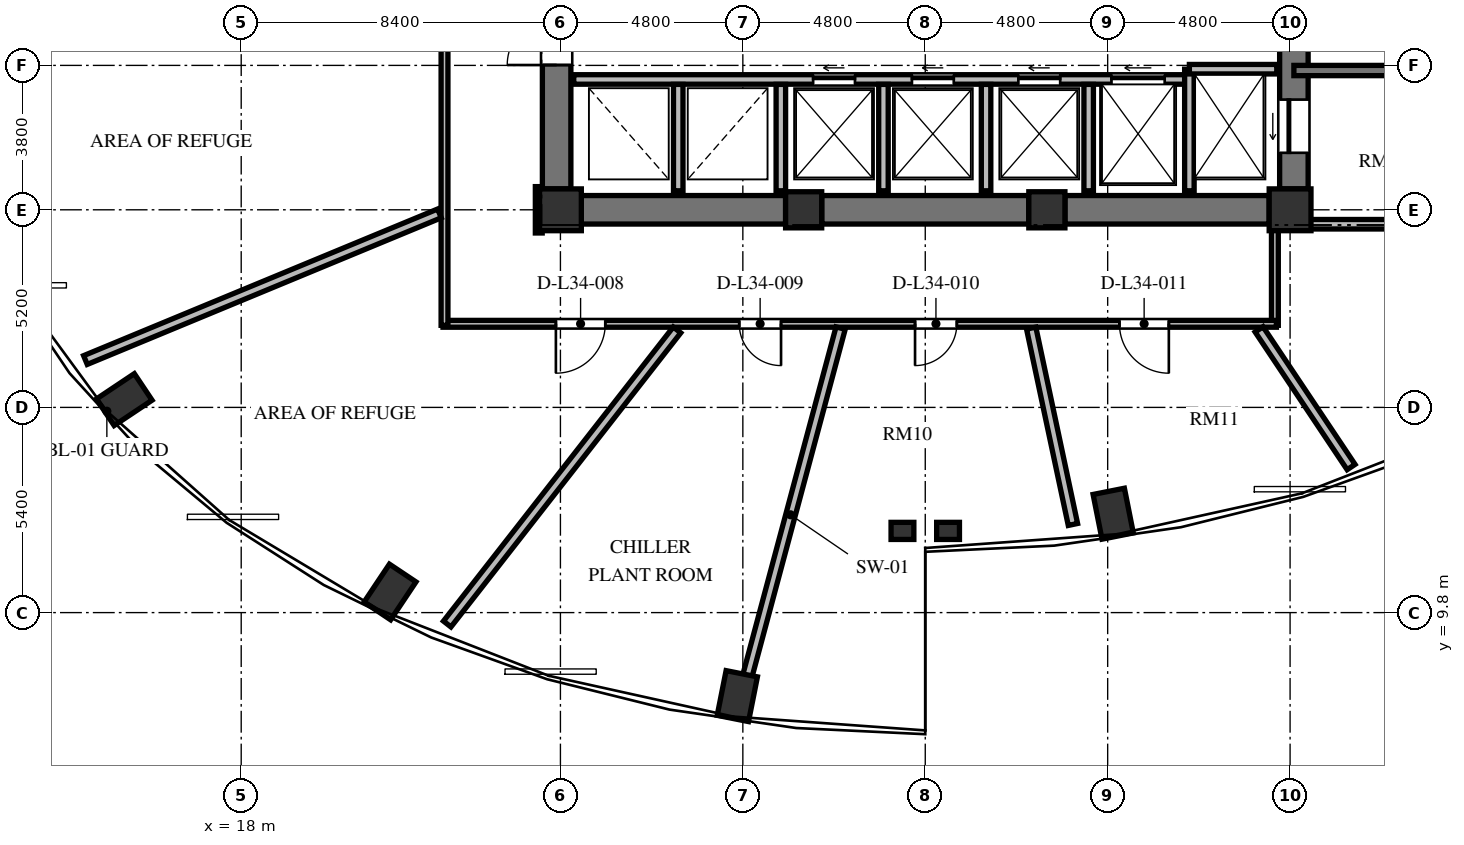
"""IFC4 building model, lengths in metres.
Left out: names, types, materials, properties, quantities, classifications, styles, units other than length and angle.
Written with IfcOpenShell. Run it as: python <this file> out.ifc"""

import sys

from ifc_helpers import new_model, si_unit, direction, frame, frame_2d, origin, origin_2d, place, context, subcontext, project, spatial, rectangle, extrude, element, fill, save


model = new_model("IFC4")
c1 = context("Model", 3, precision=1e-05, world=origin(), true_north=direction((0.0, 1.0)))
c2 = subcontext(c1, "Body", "Model", "MODEL_VIEW")
j1 = project(units=[si_unit("LENGTHUNIT", "METRE"), si_unit("PLANEANGLEUNIT", "RADIAN")], contexts=[c1])
p1 = place(None, origin())
s1 = spatial("IfcSite", under=j1, at=p1, CompositionType="ELEMENT")
p2 = place(p1, origin())
s2 = spatial("IfcBuilding", under=s1, at=p2, CompositionType="ELEMENT")
p3 = place(p2, frame((0.0, 0.0, 132.816)))
s3 = spatial("IfcBuildingStorey", under=s2, at=p3, CompositionType="ELEMENT", Elevation=132.816)
for number, where, z_axis, x_axis in (
    (1, (40.946, 12.403, 0.0), (0.0, 0.0, 1.0), (0.195, -0.981, 0.0)),
    (2, (14.922, 15.405, 0.0), (0.0, 0.0, 1.0), (-0.831, -0.556, 0.0)),
    (3, (21.916, 10.343, 0.0), (0.0, 0.0, 1.0), (-0.556, -0.831, 0.0)),
    (4, (31.054, 7.603, 0.0), (0.0, 0.0, 1.0), (-0.195, -0.981, 0.0)),
):
    element("IfcColumn", number, at=place(p3, frame(where, z_axis=z_axis, x_axis=x_axis)), inside=s3, PredefinedType="COLUMN", context=c2, shape_type="SweptSolid", body=[
        extrude(rectangle(XDim=1.2, YDim=0.84, at=origin_2d()), origin(), (0.0, 0.0, 1.0), 5.472),
    ])
p4 = place(p3, frame((26.4, 20.4, 0.0), z_axis=(0.0, 0.0, 1.0), x_axis=(1.0, 0.0, 0.0)))
e5 = element("IfcColumn", 5, at=p4, inside=s3, PredefinedType="COLUMN", context=c2, shape_type="SweptSolid", body=[
    extrude(rectangle(XDim=1.1, YDim=1.1, at=origin_2d()), origin(), (0.0, 0.0, 1.0), 5.472),
])
for number, where, z_axis, x_axis in (
    (6, (32.8, 20.4, 0.0), (0.0, 0.0, 1.0), (1.0, 0.0, 0.0)),
    (7, (39.2, 20.4, 0.0), (0.0, 0.0, 1.0), (1.0, 0.0, 0.0)),
):
    element("IfcColumn", number, at=place(p3, frame(where, z_axis=z_axis, x_axis=x_axis)), inside=s3, PredefinedType="COLUMN", context=c2, shape_type="SweptSolid", body=[
        extrude(rectangle(XDim=0.95, YDim=0.95, at=origin_2d()), origin(), (0.0, 0.0, 1.0), 5.472),
    ])
p5 = place(p3, frame((45.6, 20.4, 0.0), z_axis=(0.0, 0.0, 1.0), x_axis=(1.0, 0.0, 0.0)))
e8 = element("IfcColumn", 8, at=p5, inside=s3, PredefinedType="COLUMN", context=c2, shape_type="SweptSolid", body=[
    extrude(rectangle(XDim=1.1, YDim=1.1, at=origin_2d()), origin(), (0.0, 0.0, 1.0), 5.472),
])
for number, where, z_axis, x_axis in (
    (9, (35.4, 11.95, 0.0), (0.0, 0.0, 1.0), (1.0, 0.0, 0.0)),
    (10, (36.6, 11.95, 0.0), (0.0, 0.0, 1.0), (1.0, 0.0, 0.0)),
):
    element("IfcColumn", number, at=place(p3, frame(where, z_axis=z_axis, x_axis=x_axis)), inside=s3, PredefinedType="PILASTER", context=c2, shape_type="SweptSolid", body=[
        extrude(rectangle(XDim=0.6, YDim=0.45, at=origin_2d()), origin(), (0.0, 0.0, 1.0), 5.472),
    ])
p6 = place(p3, frame((26.3, 20.95, 0.0), z_axis=(0.0, 0.0, 1.0), x_axis=(0.0, 1.0, 0.0)))
e11 = element("IfcWall", 11, at=p6, inside=s3, PredefinedType="SHEAR", context=c2, shape_type="SweptSolid", body=[
    extrude(rectangle(XDim=14.1, YDim=0.75, at=frame_2d((7.05, 0.0))), origin(), (0.0, 0.0, 1.0), 5.472),
])
p7 = place(p6, frame((6.5, 0.0, 0.0)))
e12 = element("IfcOpeningElement", 12, at=p7, cuts=e11, PredefinedType="OPENING", context=c2, shape_type="SweptSolid", body=[
    extrude(rectangle(XDim=1.2, YDim=2.15, at=frame_2d((0.6, 1.075))), frame((0.0, 0.385, 0.0), z_axis=(0.0, -1.0, 0.0), x_axis=(1.0, 0.0, 0.0)), (0.0, 0.0, 1.0), 0.77),
])
p8 = place(p6, frame((9.6, 0.0, 0.0)))
e13 = element("IfcOpeningElement", 13, at=p8, cuts=e11, PredefinedType="OPENING", context=c2, shape_type="SweptSolid", body=[
    extrude(rectangle(XDim=1.3, YDim=2.2, at=frame_2d((0.65, 1.1))), frame((0.0, 0.385, 0.0), z_axis=(0.0, -1.0, 0.0), x_axis=(1.0, 0.0, 0.0)), (0.0, 0.0, 1.0), 0.77),
])
p9 = place(p6, frame((3.26, 0.0, 0.0)))
e14 = element("IfcOpeningElement", 14, at=p9, cuts=e11, PredefinedType="OPENING", context=c2, shape_type="SweptSolid", body=[
    extrude(rectangle(XDim=1.3, YDim=2.2, at=frame_2d((0.65, 1.1))), frame((0.0, 0.385, 0.0), z_axis=(0.0, -1.0, 0.0), x_axis=(1.0, 0.0, 0.0)), (0.0, 0.0, 1.0), 0.77),
])
p10 = place(p3, frame((45.7, 20.95, 0.0), z_axis=(0.0, 0.0, 1.0), x_axis=(0.0, 1.0, 0.0)))
e15 = element("IfcWall", 15, at=p10, inside=s3, PredefinedType="SHEAR", context=c2, shape_type="SweptSolid", body=[
    extrude(rectangle(XDim=14.1, YDim=0.75, at=frame_2d((7.05, 0.0))), origin(), (0.0, 0.0, 1.0), 5.472),
])
p11 = place(p10, frame((11.75, 0.0, 0.0)))
e16 = element("IfcOpeningElement", 16, at=p11, cuts=e15, PredefinedType="OPENING", context=c2, shape_type="SweptSolid", body=[
    extrude(rectangle(XDim=1.4, YDim=2.3, at=frame_2d((0.7, 1.15))), frame((0.0, 0.385, 0.0), z_axis=(0.0, -1.0, 0.0), x_axis=(1.0, 0.0, 0.0)), (0.0, 0.0, 1.0), 0.77),
])
p12 = place(p10, frame((0.95, 0.0, 0.0)))
e17 = element("IfcOpeningElement", 17, at=p12, cuts=e15, PredefinedType="OPENING", context=c2, shape_type="SweptSolid", body=[
    extrude(rectangle(XDim=1.4, YDim=2.3, at=frame_2d((0.7, 1.15))), frame((0.0, 0.385, 0.0), z_axis=(0.0, -1.0, 0.0), x_axis=(1.0, 0.0, 0.0)), (0.0, 0.0, 1.0), 0.77),
])
p13 = place(p3, frame((26.95, 20.4, 0.0), z_axis=(0.0, 0.0, 1.0), x_axis=(1.0, 0.0, 0.0)))
e18 = element("IfcWall", 18, at=p13, inside=s3, PredefinedType="SHEAR", context=c2, shape_type="SweptSolid", body=[
    extrude(rectangle(XDim=5.375, YDim=0.75, at=frame_2d((2.688, 0.0))), origin(), (0.0, 0.0, 1.0), 5.472),
])
p14 = place(p3, frame((33.275, 20.4, 0.0), z_axis=(0.0, 0.0, 1.0), x_axis=(1.0, 0.0, 0.0)))
e19 = element("IfcWall", 19, at=p14, inside=s3, PredefinedType="SHEAR", context=c2, shape_type="SweptSolid", body=[
    extrude(rectangle(XDim=5.45, YDim=0.75, at=frame_2d((2.725, 0.0))), origin(), (0.0, 0.0, 1.0), 5.472),
])
p15 = place(p3, frame((39.675, 20.4, 0.0), z_axis=(0.0, 0.0, 1.0), x_axis=(1.0, 0.0, 0.0)))
e20 = element("IfcWall", 20, at=p15, inside=s3, PredefinedType="SHEAR", context=c2, shape_type="SweptSolid", body=[
    extrude(rectangle(XDim=5.375, YDim=0.75, at=frame_2d((2.688, 0.0))), origin(), (0.0, 0.0, 1.0), 5.472),
])
p16 = place(p3, frame((26.75, 23.83, 0.0), z_axis=(0.0, 0.0, 1.0), x_axis=(1.0, 0.0, 0.0)))
e21 = element("IfcWall", 21, at=p16, inside=s3, PredefinedType="SOLIDWALL", context=c2, shape_type="SweptSolid", body=[
    extrude(rectangle(XDim=16.2, YDim=0.25, at=frame_2d((8.1, 0.0))), origin(), (0.0, 0.0, 1.0), 5.022),
])
p17 = place(p16, frame((6.3, 0.0, 0.0)))
e22 = element("IfcOpeningElement", 22, at=p17, cuts=e21, PredefinedType="OPENING", context=c2, shape_type="SweptSolid", body=[
    extrude(rectangle(XDim=1.1, YDim=2.2, at=frame_2d((0.55, 1.1))), frame((0.0, 0.135, 0.0), z_axis=(0.0, -1.0, 0.0), x_axis=(1.0, 0.0, 0.0)), (0.0, 0.0, 1.0), 0.27),
])
p18 = place(p16, frame((8.9, 0.0, 0.0)))
e23 = element("IfcOpeningElement", 23, at=p18, cuts=e21, PredefinedType="OPENING", context=c2, shape_type="SweptSolid", body=[
    extrude(rectangle(XDim=1.1, YDim=2.2, at=frame_2d((0.55, 1.1))), frame((0.0, 0.135, 0.0), z_axis=(0.0, -1.0, 0.0), x_axis=(1.0, 0.0, 0.0)), (0.0, 0.0, 1.0), 0.27),
])
p19 = place(p16, frame((11.7, 0.0, 0.0)))
e24 = element("IfcOpeningElement", 24, at=p19, cuts=e21, PredefinedType="OPENING", context=c2, shape_type="SweptSolid", body=[
    extrude(rectangle(XDim=1.1, YDim=2.2, at=frame_2d((0.55, 1.1))), frame((0.0, 0.135, 0.0), z_axis=(0.0, -1.0, 0.0), x_axis=(1.0, 0.0, 0.0)), (0.0, 0.0, 1.0), 0.27),
])
p20 = place(p16, frame((14.15, 0.0, 0.0)))
e25 = element("IfcOpeningElement", 25, at=p20, cuts=e21, PredefinedType="OPENING", context=c2, shape_type="SweptSolid", body=[
    extrude(rectangle(XDim=1.4, YDim=2.3, at=frame_2d((0.7, 1.15))), frame((0.0, 0.135, 0.0), z_axis=(0.0, -1.0, 0.0), x_axis=(1.0, 0.0, 0.0)), (0.0, 0.0, 1.0), 0.27),
])
p21 = place(p3, frame((42.95, 20.9, 0.0), z_axis=(0.0, 0.0, 1.0), x_axis=(0.0, 1.0, 0.0)))
e26 = element("IfcWall", 26, at=p21, inside=s3, PredefinedType="SOLIDWALL", context=c2, shape_type="SweptSolid", body=[
    extrude(rectangle(XDim=3.2, YDim=0.25, at=frame_2d((1.6, 0.0))), origin(), (0.0, 0.0, 1.0), 5.022),
])
p22 = place(p3, frame((42.95, 24.1, 0.0), z_axis=(0.0, 0.0, 1.0), x_axis=(1.0, 0.0, 0.0)))
e27 = element("IfcWall", 27, at=p22, inside=s3, PredefinedType="SOLIDWALL", context=c2, shape_type="SweptSolid", body=[
    extrude(rectangle(XDim=2.3, YDim=0.25, at=frame_2d((1.15, 0.0))), origin(), (0.0, 0.0, 1.0), 5.022),
])
for number, where, z_axis, x_axis in (
    (28, (29.5, 20.9, 0.0), (0.0, 0.0, 1.0), (0.0, 1.0, 0.0)),
    (29, (32.2, 20.9, 0.0), (0.0, 0.0, 1.0), (0.0, 1.0, 0.0)),
    (30, (34.9, 20.9, 0.0), (0.0, 0.0, 1.0), (0.0, 1.0, 0.0)),
    (31, (37.6, 20.9, 0.0), (0.0, 0.0, 1.0), (0.0, 1.0, 0.0)),
    (32, (40.3, 20.9, 0.0), (0.0, 0.0, 1.0), (0.0, 1.0, 0.0)),
):
    element("IfcWall", number, at=place(p3, frame(where, z_axis=z_axis, x_axis=x_axis)), inside=s3, PredefinedType="SOLIDWALL", context=c2, shape_type="SweptSolid", body=[
        extrude(rectangle(XDim=2.8, YDim=0.25, at=frame_2d((1.4, 0.0))), origin(), (0.0, 0.0, 1.0), 5.022),
    ])
p23 = place(p3, frame((45.7, 24.065, 0.0), z_axis=(0.0, 0.0, 1.0), x_axis=(1.0, 0.0, 0.0)))
e33 = element("IfcWall", 33, at=p23, inside=s3, PredefinedType="SHEAR", context=c2, shape_type="SweptSolid", body=[
    extrude(rectangle(XDim=4.715, YDim=0.27, at=frame_2d((2.357, 0.0))), origin(), (0.0, 0.0, 1.0), 5.472),
])
p24 = place(p3, frame((45.7, 20.02, 0.0), z_axis=(0.0, 0.0, 1.0), x_axis=(1.0, 0.0, 0.0)))
e34 = element("IfcWall", 34, at=p24, inside=s3, PredefinedType="SOLIDWALL", context=c2, shape_type="SweptSolid", body=[
    extrude(rectangle(XDim=4.715, YDim=0.25, at=frame_2d((2.357, 0.0))), origin(), (0.0, 0.0, 1.0), 5.022),
])
p25 = place(p3, frame((25.83, 21.01, 0.0), z_axis=(0.0, 0.0, 1.0), x_axis=(0.0, -1.0, 0.0)))
e35 = element("IfcWall", 35, at=p25, inside=s3, PredefinedType="PARTITIONING", context=c2, shape_type="SweptSolid", body=[
    extrude(rectangle(XDim=1.22, YDim=0.18, at=frame_2d((0.61, 0.0))), origin(), (0.0, 0.0, 1.0), 5.022),
])
p26 = place(p3, frame((45.2, 19.91, 0.0), z_axis=(0.0, 0.0, 1.0), x_axis=(0.0, -1.0, 0.0)))
e36 = element("IfcWall", 36, at=p26, inside=s3, PredefinedType="PARTITIONING", context=c2, shape_type="SweptSolid", body=[
    extrude(rectangle(XDim=2.55, YDim=0.18, at=frame_2d((1.275, 0.0))), origin(), (0.0, 0.0, 1.0), 5.022),
])
p27 = place(p3, frame((45.24, 17.4, 0.0), z_axis=(0.0, 0.0, 1.0), x_axis=(-1.0, 0.0, 0.0)))
e37 = element("IfcWall", 37, at=p27, inside=s3, PredefinedType="PARTITIONING", context=c2, shape_type="SweptSolid", body=[
    extrude(rectangle(XDim=21.93, YDim=0.18, at=frame_2d((10.965, 0.0))), origin(), (0.0, 0.0, 1.0), 4.647),
])
p28 = place(p27, frame((17.659, 0.0, 0.0)))
e38 = element("IfcOpeningElement", 38, at=p28, cuts=e37, PredefinedType="OPENING", context=c2, shape_type="SweptSolid", body=[
    extrude(rectangle(XDim=1.3, YDim=2.2, at=frame_2d((0.65, 1.1))), frame((0.0, 0.1, 0.0), z_axis=(0.0, -1.0, 0.0), x_axis=(1.0, 0.0, 0.0)), (0.0, 0.0, 1.0), 0.2),
])
p29 = place(p27, frame((13.035, 0.0, 0.0)))
e39 = element("IfcOpeningElement", 39, at=p29, cuts=e37, PredefinedType="OPENING", context=c2, shape_type="SweptSolid", body=[
    extrude(rectangle(XDim=1.1, YDim=2.15, at=frame_2d((0.55, 1.075))), frame((0.0, 0.1, 0.0), z_axis=(0.0, -1.0, 0.0), x_axis=(1.0, 0.0, 0.0)), (0.0, 0.0, 1.0), 0.2),
])
p30 = place(p27, frame((8.409, 0.0, 0.0)))
e40 = element("IfcOpeningElement", 40, at=p30, cuts=e37, PredefinedType="OPENING", context=c2, shape_type="SweptSolid", body=[
    extrude(rectangle(XDim=1.1, YDim=2.15, at=frame_2d((0.55, 1.075))), frame((0.0, 0.1, 0.0), z_axis=(0.0, -1.0, 0.0), x_axis=(1.0, 0.0, 0.0)), (0.0, 0.0, 1.0), 0.2),
])
p31 = place(p27, frame((2.831, 0.0, 0.0)))
e41 = element("IfcOpeningElement", 41, at=p31, cuts=e37, PredefinedType="OPENING", context=c2, shape_type="SweptSolid", body=[
    extrude(rectangle(XDim=1.3, YDim=2.2, at=frame_2d((0.65, 1.1))), frame((0.0, 0.1, 0.0), z_axis=(0.0, -1.0, 0.0), x_axis=(1.0, 0.0, 0.0)), (0.0, 0.0, 1.0), 0.2),
])
p32 = place(p3, frame((23.35, 17.36, 0.0), z_axis=(0.0, 0.0, 1.0), x_axis=(0.0, 1.0, 0.0)))
e42 = element("IfcWall", 42, at=p32, inside=s3, PredefinedType="PARTITIONING", context=c2, shape_type="SweptSolid", body=[
    extrude(rectangle(XDim=9.28, YDim=0.18, at=frame_2d((4.64, 0.0))), origin(), (0.0, 0.0, 1.0), 4.707),
])
p33 = place(p3, frame((38.787, 17.286, 0.0), z_axis=(0.0, 0.0, 1.0), x_axis=(0.207922319459, -0.978145341486, 0.0)))
e43 = element("IfcWall", 43, at=p33, inside=s3, PredefinedType="SOLIDWALL", context=c2, shape_type="SweptSolid", body=[
    extrude(rectangle(XDim=5.283, YDim=0.25, at=frame_2d((2.641, 0.0))), origin(), (0.0, 0.0, 1.0), 5.022),
])
p34 = place(p3, frame((44.784, 17.253, 0.0), z_axis=(0.0, 0.0, 1.0), x_axis=(0.555553222681, -0.831480977996, 0.0)))
e44 = element("IfcWall", 44, at=p34, inside=s3, PredefinedType="SOLIDWALL", context=c2, shape_type="SweptSolid", body=[
    extrude(rectangle(XDim=4.358, YDim=0.25, at=frame_2d((2.179, 0.0))), origin(), (0.0, 0.0, 1.0), 5.022),
])
p35 = place(p3, frame((23.217, 20.305, 0.0), z_axis=(0.0, 0.0, 1.0), x_axis=(-0.923880790032, -0.382680396427, 0.0)))
e45 = element("IfcWall", 45, at=p35, inside=s3, PredefinedType="SOLIDWALL", context=c2, shape_type="SweptSolid", body=[
    extrude(rectangle(XDim=10.083, YDim=0.25, at=frame_2d((5.042, 0.0))), origin(), (0.0, 0.0, 1.0), 5.022),
])
p36 = place(p3, frame((29.467, 17.239, 0.0), z_axis=(0.0, 0.0, 1.0), x_axis=(-0.615661890961, -0.788010428877, 0.0)))
e46 = element("IfcWall", 46, at=p36, inside=s3, PredefinedType="SOLIDWALL", context=c2, shape_type="SweptSolid", body=[
    extrude(rectangle(XDim=9.821, YDim=0.25, at=frame_2d((4.911, 0.0))), origin(), (0.0, 0.0, 1.0), 5.022),
])
p37 = place(p3, frame((33.773, 17.287, 0.0), z_axis=(0.0, 0.0, 1.0), x_axis=(-0.258842443141, -0.9659195565, 0.0)))
e47 = element("IfcWall", 47, at=p37, inside=s3, PredefinedType="SOLIDWALL", context=c2, shape_type="SweptSolid", body=[
    extrude(rectangle(XDim=10.173, YDim=0.25, at=frame_2d((5.087, 0.0))), origin(), (0.0, 0.0, 1.0), 3.607),
])
p38 = place(p9, origin())
e48 = element("IfcDoor", 48, at=p38, inside=s3, OperationType="SINGLE_SWING_LEFT", PredefinedType="DOOR", context=c2, shape_type="SweptSolid", body=[
    extrude(rectangle(XDim=1.3, YDim=2.2, at=frame_2d((0.65, 1.1))), frame((0.0, 0.025, 0.0), z_axis=(0.0, -1.0, 0.0), x_axis=(1.0, 0.0, 0.0)), (0.0, 0.0, 1.0), 0.05),
])
fill(e14, e48)
p39 = place(p17, origin())
e49 = element("IfcDoor", 49, at=p39, inside=s3, OperationType="SLIDING_TO_LEFT", PredefinedType="DOOR", context=c2, shape_type="SweptSolid", body=[
    extrude(rectangle(XDim=1.1, YDim=2.2, at=frame_2d((0.55, 1.1))), frame((0.0, 0.025, 0.0), z_axis=(0.0, -1.0, 0.0), x_axis=(1.0, 0.0, 0.0)), (0.0, 0.0, 1.0), 0.05),
])
fill(e22, e49)
p40 = place(p18, origin())
e50 = element("IfcDoor", 50, at=p40, inside=s3, OperationType="SLIDING_TO_LEFT", PredefinedType="DOOR", context=c2, shape_type="SweptSolid", body=[
    extrude(rectangle(XDim=1.1, YDim=2.2, at=frame_2d((0.55, 1.1))), frame((0.0, 0.025, 0.0), z_axis=(0.0, -1.0, 0.0), x_axis=(1.0, 0.0, 0.0)), (0.0, 0.0, 1.0), 0.05),
])
fill(e23, e50)
p41 = place(p19, origin())
e51 = element("IfcDoor", 51, at=p41, inside=s3, OperationType="SLIDING_TO_LEFT", PredefinedType="DOOR", context=c2, shape_type="SweptSolid", body=[
    extrude(rectangle(XDim=1.1, YDim=2.2, at=frame_2d((0.55, 1.1))), frame((0.0, 0.025, 0.0), z_axis=(0.0, -1.0, 0.0), x_axis=(1.0, 0.0, 0.0)), (0.0, 0.0, 1.0), 0.05),
])
fill(e24, e51)
p42 = place(p12, origin())
e52 = element("IfcDoor", 52, at=p42, inside=s3, OperationType="SLIDING_TO_LEFT", PredefinedType="DOOR", context=c2, shape_type="SweptSolid", body=[
    extrude(rectangle(XDim=1.4, YDim=2.3, at=frame_2d((0.7, 1.15))), frame((0.0, 0.025, 0.0), z_axis=(0.0, -1.0, 0.0), x_axis=(1.0, 0.0, 0.0)), (0.0, 0.0, 1.0), 0.05),
])
fill(e17, e52)
p43 = place(p20, origin())
e53 = element("IfcDoor", 53, at=p43, inside=s3, OperationType="SLIDING_TO_LEFT", PredefinedType="DOOR", context=c2, shape_type="SweptSolid", body=[
    extrude(rectangle(XDim=1.4, YDim=2.3, at=frame_2d((0.7, 1.15))), frame((0.0, 0.025, 0.0), z_axis=(0.0, -1.0, 0.0), x_axis=(1.0, 0.0, 0.0)), (0.0, 0.0, 1.0), 0.05),
])
fill(e25, e53)
p44 = place(p28, origin())
e54 = element("IfcDoor", 54, at=p44, inside=s3, OperationType="SINGLE_SWING_RIGHT", PredefinedType="DOOR", context=c2, shape_type="SweptSolid", body=[
    extrude(rectangle(XDim=1.3, YDim=2.2, at=frame_2d((0.65, 1.1))), frame((0.0, 0.025, 0.0), z_axis=(0.0, -1.0, 0.0), x_axis=(1.0, 0.0, 0.0)), (0.0, 0.0, 1.0), 0.05),
])
fill(e38, e54)
p45 = place(p29, origin())
e55 = element("IfcDoor", 55, at=p45, inside=s3, OperationType="SINGLE_SWING_LEFT", PredefinedType="DOOR", context=c2, shape_type="SweptSolid", body=[
    extrude(rectangle(XDim=1.1, YDim=2.15, at=frame_2d((0.55, 1.075))), frame((0.0, 0.025, 0.0), z_axis=(0.0, -1.0, 0.0), x_axis=(1.0, 0.0, 0.0)), (0.0, 0.0, 1.0), 0.05),
])
fill(e39, e55)
p46 = place(p30, origin())
e56 = element("IfcDoor", 56, at=p46, inside=s3, OperationType="SINGLE_SWING_RIGHT", PredefinedType="DOOR", context=c2, shape_type="SweptSolid", body=[
    extrude(rectangle(XDim=1.1, YDim=2.15, at=frame_2d((0.55, 1.075))), frame((0.0, 0.025, 0.0), z_axis=(0.0, -1.0, 0.0), x_axis=(1.0, 0.0, 0.0)), (0.0, 0.0, 1.0), 0.05),
])
fill(e40, e56)
p47 = place(p31, origin())
e57 = element("IfcDoor", 57, at=p47, inside=s3, OperationType="SINGLE_SWING_LEFT", PredefinedType="DOOR", context=c2, shape_type="SweptSolid", body=[
    extrude(rectangle(XDim=1.3, YDim=2.2, at=frame_2d((0.65, 1.1))), frame((0.0, 0.025, 0.0), z_axis=(0.0, -1.0, 0.0), x_axis=(1.0, 0.0, 0.0)), (0.0, 0.0, 1.0), 0.05),
])
fill(e41, e57)
save(model, sys.argv[1])
